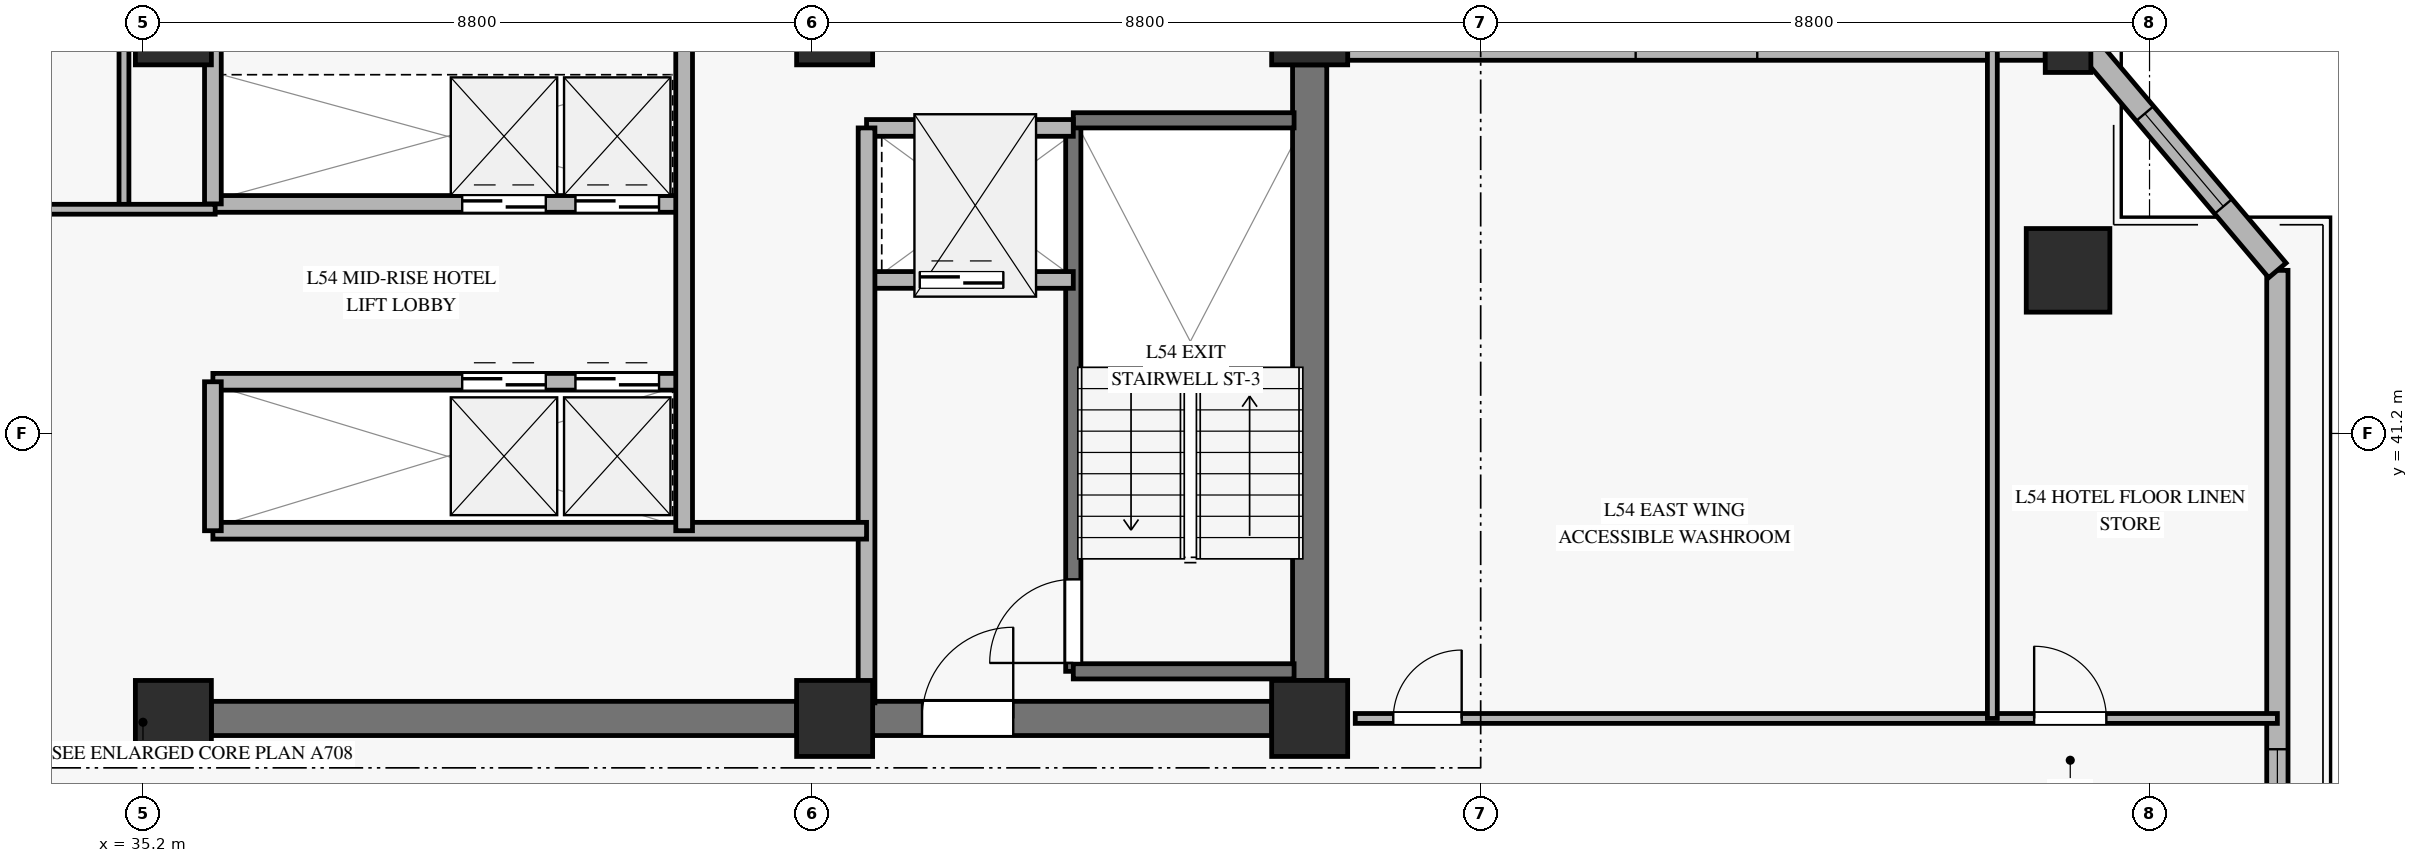
"""IFC4 building model, lengths in metres.
Left out: names, types, materials, properties, quantities, classifications, styles, units other than length and angle.
Written with IfcOpenShell. Run it as: python <this file> out.ifc"""

import sys

from ifc_helpers import new_model, si_unit, direction, frame, frame_2d, origin, origin_2d, place, context, subcontext, project, spatial, rectangle, hollow_rectangle, extrude, source, transform, mapped, element, fill, save


model = new_model("IFC4")
c1 = context("Model", 3, precision=1e-05, world=origin(), true_north=direction((0.0, 1.0)))
c2 = subcontext(c1, "Body", "Model", "MODEL_VIEW")
j1 = project(units=[si_unit("LENGTHUNIT", "METRE"), si_unit("PLANEANGLEUNIT", "RADIAN")], contexts=[c1])
p1 = place(None, origin())
s1 = spatial("IfcSite", under=j1, at=p1, CompositionType="ELEMENT")
p2 = place(p1, origin())
s2 = spatial("IfcBuilding", under=s1, at=p2, CompositionType="ELEMENT")
p3 = place(p2, frame((0.0, 0.0, 213.2)))
s3 = spatial("IfcBuildingStorey", under=s2, at=p3, CompositionType="ELEMENT", Elevation=213.2)
m1 = source(origin(), c2, "Body", "SweptSolid", [
    extrude(rectangle(XDim=1.0, YDim=1.0, at=origin_2d()), origin(), (0.0, 0.0, 1.0), 3.27),
])
for number, where, z_axis, x_axis in (
    (1, (35.6, 37.45, 0.0), (0.0, 0.0, 1.0), (1.0, 0.0, 0.0)),
    (2, (35.6, 46.55, 0.0), (0.0, 0.0, 1.0), (1.0, 0.0, 0.0)),
    (3, (44.3, 37.45, 0.0), (0.0, 0.0, 1.0), (1.0, 0.0, 0.0)),
    (4, (44.3, 46.55, 0.0), (0.0, 0.0, 1.0), (1.0, 0.0, 0.0)),
    (5, (50.55, 37.45, 0.0), (0.0, 0.0, 1.0), (1.0, 0.0, 0.0)),
    (6, (50.55, 46.55, 0.0), (0.0, 0.0, 1.0), (1.0, 0.0, 0.0)),
):
    element("IfcColumn", number, at=place(p3, frame(where, z_axis=z_axis, x_axis=x_axis)), inside=s3, PredefinedType="PILASTER", context=c2, shape_type="MappedRepresentation", body=[
        mapped(m1, transform((0.0, 0.0, 0.0), x_axis=(1.0, 0.0, 0.0), y_axis=(0.0, 1.0, 0.0), z_axis=(0.0, 0.0, 1.0), scale=1.0)),
    ])
p4 = place(p3, frame((36.1, 37.45, 0.0), z_axis=(0.0, 0.0, 1.0), x_axis=(1.0, 0.0, 0.0)))
e7 = element("IfcWall", 7, at=p4, inside=s3, PredefinedType="SHEAR", context=c2, shape_type="SweptSolid", body=[
    extrude(rectangle(XDim=7.7, YDim=0.45, at=frame_2d((3.85, 0.0))), origin(), (0.0, 0.0, 1.0), 3.27),
])
p5 = place(p3, frame((44.8, 37.45, 0.0), z_axis=(0.0, 0.0, 1.0), x_axis=(1.0, 0.0, 0.0)))
e8 = element("IfcWall", 8, at=p5, inside=s3, PredefinedType="SHEAR", context=c2, shape_type="SweptSolid", body=[
    extrude(rectangle(XDim=5.25, YDim=0.45, at=frame_2d((2.625, 0.0))), origin(), (0.0, 0.0, 1.0), 3.27),
])
p6 = place(p5, frame((0.65, 0.0, 0.0)))
e9 = element("IfcOpeningElement", 9, at=p6, cuts=e8, PredefinedType="OPENING", context=c2, shape_type="SweptSolid", body=[
    extrude(rectangle(XDim=1.2, YDim=2.15, at=frame_2d((0.6, 1.075))), frame((0.0, 0.235, 0.0), z_axis=(0.0, -1.0, 0.0), x_axis=(1.0, 0.0, 0.0)), (0.0, 0.0, 1.0), 0.47),
])
p7 = place(p3, frame((50.55, 37.95, 0.0), z_axis=(0.0, 0.0, 1.0), x_axis=(0.0, 1.0, 0.0)))
e10 = element("IfcWall", 10, at=p7, inside=s3, PredefinedType="SHEAR", context=c2, shape_type="SweptSolid", body=[
    extrude(rectangle(XDim=8.1, YDim=0.45, at=frame_2d((4.05, 0.0))), origin(), (0.0, 0.0, 1.0), 3.27),
])
m2 = source(origin(), c2, "Body", "SweptSolid", [
    extrude(hollow_rectangle(XDim=1.1, YDim=1.1, WallThickness=0.05, at=origin_2d()), origin(), (0.0, 0.0, 1.0), 3.27),
])
p8 = place(p3, frame((60.528, 43.346, 0.0), z_axis=(0.0, 0.0, 1.0), x_axis=(1.0, 0.0, 0.0)))
e11 = element("IfcColumn", 11, at=p8, inside=s3, PredefinedType="COLUMN", context=c2, shape_type="MappedRepresentation", body=[
    mapped(m2, transform((0.0, 0.0, 0.0), x_axis=(1.0, 0.0, 0.0), y_axis=(0.0, 1.0, 0.0), z_axis=(0.0, 0.0, 1.0), scale=1.0)),
])
m3 = source(origin(), c2, "Body", "SweptSolid", [
    extrude(hollow_rectangle(XDim=0.6, YDim=0.6, WallThickness=0.028, at=origin_2d()), origin(), (0.0, 0.0, 1.0), 3.27),
])
p9 = place(p3, frame((60.528, 46.25, 0.0), z_axis=(0.0, 0.0, 1.0), x_axis=(1.0, 0.0, 0.0)))
e12 = element("IfcColumn", 12, at=p9, inside=s3, PredefinedType="COLUMN", context=c2, shape_type="MappedRepresentation", body=[
    mapped(m3, transform((0.0, 0.0, 0.0), x_axis=(1.0, 0.0, 0.0), y_axis=(0.0, 1.0, 0.0), z_axis=(0.0, 0.0, 1.0), scale=1.0)),
])
p10 = place(p3, frame((63.282, 29.509, 0.0), z_axis=(0.0, 0.0, 1.0), x_axis=(0.0, 1.0, 0.0)))
e13 = element("IfcWall", 13, at=p10, inside=s3, PredefinedType="SOLIDWALL", context=c2, shape_type="SweptSolid", body=[
    extrude(rectangle(XDim=13.837, YDim=0.28, at=frame_2d((6.918, 0.0))), origin(), (0.0, 0.0, 1.0), 2.75),
])
p11 = place(p10, frame((5.536, 0.0, 0.45)))
e14 = element("IfcOpeningElement", 14, at=p11, cuts=e13, PredefinedType="OPENING", context=c2, shape_type="SweptSolid", body=[
    extrude(rectangle(XDim=2.0, YDim=2.0, at=frame_2d((1.0, 1.0))), frame((0.0, 0.15, 0.0), z_axis=(0.0, -1.0, 0.0), x_axis=(1.0, 0.0, 0.0)), (0.0, 0.0, 1.0), 0.3),
])
p12 = place(p3, frame((51.05, 46.25, 0.0), z_axis=(0.0, 0.0, 1.0), x_axis=(1.0, 0.0, 0.0)))
e15 = element("IfcWall", 15, at=p12, inside=s3, PredefinedType="SOLIDWALL", context=c2, shape_type="SweptSolid", body=[
    extrude(rectangle(XDim=9.178, YDim=0.28, at=frame_2d((4.589, 0.0))), origin(), (0.0, 0.0, 1.0), 2.75),
])
p13 = place(p12, frame((3.789, 0.0, 0.45)))
e16 = element("IfcOpeningElement", 16, at=p13, cuts=e15, PredefinedType="OPENING", context=c2, shape_type="SweptSolid", body=[
    extrude(rectangle(XDim=1.6, YDim=2.0, at=frame_2d((0.8, 1.0))), frame((0.0, 0.15, 0.0), z_axis=(0.0, -1.0, 0.0), x_axis=(1.0, 0.0, 0.0)), (0.0, 0.0, 1.0), 0.3),
])
p14 = place(p3, frame((63.282, 43.346, 0.0), z_axis=(0.0, 0.0, 1.0), x_axis=(-0.645455651603, 0.763797749286, 0.0)))
e17 = element("IfcWall", 17, at=p14, inside=s3, PredefinedType="SOLIDWALL", context=c2, shape_type="SweptSolid", body=[
    extrude(rectangle(XDim=3.802, YDim=0.3, at=frame_2d((1.901, 0.0))), origin(), (0.0, 0.0, 1.0), 2.75),
])
p15 = place(p14, frame((1.101, 0.0, 0.45)))
e18 = element("IfcOpeningElement", 18, at=p15, cuts=e17, PredefinedType="OPENING", context=c2, shape_type="SweptSolid", body=[
    extrude(rectangle(XDim=1.6, YDim=2.0, at=frame_2d((0.8, 1.0))), frame((0.0, 0.16, 0.0), z_axis=(0.0, -1.0, 0.0), x_axis=(1.0, 0.0, 0.0)), (0.0, 0.0, 1.0), 0.32),
])
p16 = place(p3, frame((47.44, 38.07, 0.0), z_axis=(0.0, 0.0, 1.0), x_axis=(0.0, 1.0, 0.0)))
e19 = element("IfcWall", 19, at=p16, inside=s3, PredefinedType="SOLIDWALL", context=c2, shape_type="SweptSolid", body=[
    extrude(rectangle(XDim=7.25, YDim=0.2, at=frame_2d((3.625, 0.0))), origin(), (0.0, 0.0, 1.0), 3.5),
])
p17 = place(p16, frame((0.11, 0.0, 0.0)))
e20 = element("IfcOpeningElement", 20, at=p17, cuts=e19, PredefinedType="OPENING", context=c2, shape_type="SweptSolid", body=[
    extrude(rectangle(XDim=1.1, YDim=2.15, at=frame_2d((0.55, 1.075))), frame((0.0, 0.11, 0.0), z_axis=(0.0, -1.0, 0.0), x_axis=(1.0, 0.0, 0.0)), (0.0, 0.0, 1.0), 0.22),
])
for number, where, z_axis, x_axis in (
    (21, (47.44, 45.32, 0.0), (0.0, 0.0, 1.0), (1.0, 0.0, 0.0)),
    (22, (47.44, 38.07, 0.0), (0.0, 0.0, 1.0), (1.0, 0.0, 0.0)),
):
    element("IfcWall", number, at=place(p3, frame(where, z_axis=z_axis, x_axis=x_axis)), inside=s3, PredefinedType="SOLIDWALL", context=c2, shape_type="SweptSolid", body=[
        extrude(rectangle(XDim=2.905, YDim=0.2, at=frame_2d((1.453, 0.0))), origin(), (0.0, 0.0, 1.0), 3.5),
    ])
p18 = place(p3, frame((44.72, 43.22, 0.0), z_axis=(0.0, 0.0, 1.0), x_axis=(1.0, 0.0, 0.0)))
e23 = element("IfcWall", 23, at=p18, inside=s3, PredefinedType="SOLIDWALL", context=c2, shape_type="SweptSolid", body=[
    extrude(rectangle(XDim=2.72, YDim=0.22, at=frame_2d((1.36, 0.0))), origin(), (0.0, 0.0, 1.0), 3.27),
])
p19 = place(p18, frame((0.7, 0.0, 0.0)))
e24 = element("IfcOpeningElement", 24, at=p19, cuts=e23, PredefinedType="OPENING", context=c2, shape_type="SweptSolid", body=[
    extrude(rectangle(XDim=1.1, YDim=2.2, at=frame_2d((0.55, 1.1))), frame((0.0, 0.12, 0.0), z_axis=(0.0, -1.0, 0.0), x_axis=(1.0, 0.0, 0.0)), (0.0, 0.0, 1.0), 0.24),
])
p20 = place(p3, frame((44.72, 45.22, 0.0), z_axis=(0.0, 0.0, 1.0), x_axis=(1.0, 0.0, 0.0)))
e25 = element("IfcWall", 25, at=p20, inside=s3, PredefinedType="SOLIDWALL", context=c2, shape_type="SweptSolid", body=[
    extrude(rectangle(XDim=2.72, YDim=0.22, at=frame_2d((1.36, 0.0))), origin(), (0.0, 0.0, 1.0), 3.27),
])
p21 = place(p3, frame((44.72, 37.655, 0.0), z_axis=(0.0, 0.0, 1.0), x_axis=(0.0, 1.0, 0.0)))
e26 = element("IfcWall", 26, at=p21, inside=s3, PredefinedType="SOLIDWALL", context=c2, shape_type="SweptSolid", body=[
    extrude(rectangle(XDim=7.565, YDim=0.22, at=frame_2d((3.782, 0.0))), origin(), (0.0, 0.0, 1.0), 3.27),
])
p22 = place(p3, frame((36.12, 44.22, 0.0), z_axis=(0.0, 0.0, 1.0), x_axis=(1.0, 0.0, 0.0)))
e27 = element("IfcWall", 27, at=p22, inside=s3, PredefinedType="SOLIDWALL", context=c2, shape_type="SweptSolid", body=[
    extrude(rectangle(XDim=6.2, YDim=0.22, at=frame_2d((3.1, 0.0))), origin(), (0.0, 0.0, 1.0), 3.27),
])
p23 = place(p22, frame((3.28, 0.0, 0.0)))
e28 = element("IfcOpeningElement", 28, at=p23, cuts=e27, PredefinedType="OPENING", context=c2, shape_type="SweptSolid", body=[
    extrude(rectangle(XDim=1.1, YDim=2.2, at=frame_2d((0.55, 1.1))), frame((0.0, 0.12, 0.0), z_axis=(0.0, -1.0, 0.0), x_axis=(1.0, 0.0, 0.0)), (0.0, 0.0, 1.0), 0.24),
])
p24 = place(p22, frame((4.77, 0.0, 0.0)))
e29 = element("IfcOpeningElement", 29, at=p24, cuts=e27, PredefinedType="OPENING", context=c2, shape_type="SweptSolid", body=[
    extrude(rectangle(XDim=1.1, YDim=2.2, at=frame_2d((0.55, 1.1))), frame((0.0, 0.12, 0.0), z_axis=(0.0, -1.0, 0.0), x_axis=(1.0, 0.0, 0.0)), (0.0, 0.0, 1.0), 0.24),
])
p25 = place(p3, frame((36.12, 41.88, 0.0), z_axis=(0.0, 0.0, 1.0), x_axis=(1.0, 0.0, 0.0)))
e30 = element("IfcWall", 30, at=p25, inside=s3, PredefinedType="SOLIDWALL", context=c2, shape_type="SweptSolid", body=[
    extrude(rectangle(XDim=6.2, YDim=0.22, at=frame_2d((3.1, 0.0))), origin(), (0.0, 0.0, 1.0), 3.27),
])
p26 = place(p25, frame((3.28, 0.0, 0.0)))
e31 = element("IfcOpeningElement", 31, at=p26, cuts=e30, PredefinedType="OPENING", context=c2, shape_type="SweptSolid", body=[
    extrude(rectangle(XDim=1.1, YDim=2.2, at=frame_2d((0.55, 1.1))), frame((0.0, 0.12, 0.0), z_axis=(0.0, -1.0, 0.0), x_axis=(1.0, 0.0, 0.0)), (0.0, 0.0, 1.0), 0.24),
])
p27 = place(p25, frame((4.77, 0.0, 0.0)))
e32 = element("IfcOpeningElement", 32, at=p27, cuts=e30, PredefinedType="OPENING", context=c2, shape_type="SweptSolid", body=[
    extrude(rectangle(XDim=1.1, YDim=2.2, at=frame_2d((0.55, 1.1))), frame((0.0, 0.12, 0.0), z_axis=(0.0, -1.0, 0.0), x_axis=(1.0, 0.0, 0.0)), (0.0, 0.0, 1.0), 0.24),
])
p28 = place(p3, frame((36.12, 39.92, 0.0), z_axis=(0.0, 0.0, 1.0), x_axis=(1.0, 0.0, 0.0)))
e33 = element("IfcWall", 33, at=p28, inside=s3, PredefinedType="SOLIDWALL", context=c2, shape_type="SweptSolid", body=[
    extrude(rectangle(XDim=8.6, YDim=0.22, at=frame_2d((4.3, 0.0))), origin(), (0.0, 0.0, 1.0), 2.555),
])
p29 = place(p3, frame((42.32, 39.92, 0.0), z_axis=(0.0, 0.0, 1.0), x_axis=(0.0, 1.0, 0.0)))
e34 = element("IfcWall", 34, at=p29, inside=s3, PredefinedType="SOLIDWALL", context=c2, shape_type="SweptSolid", body=[
    extrude(rectangle(XDim=6.425, YDim=0.22, at=frame_2d((3.212, 0.0))), origin(), (0.0, 0.0, 1.0), 3.27),
])
p30 = place(p3, frame((36.12, 39.92, 0.0), z_axis=(0.0, 0.0, 1.0), x_axis=(0.0, 1.0, 0.0)))
e35 = element("IfcWall", 35, at=p30, inside=s3, PredefinedType="SOLIDWALL", context=c2, shape_type="SweptSolid", body=[
    extrude(rectangle(XDim=1.96, YDim=0.22, at=frame_2d((0.98, 0.0))), origin(), (0.0, 0.0, 1.0), 3.27),
])
p31 = place(p3, frame((36.12, 44.22, 0.0), z_axis=(0.0, 0.0, 1.0), x_axis=(0.0, 1.0, 0.0)))
e36 = element("IfcWall", 36, at=p31, inside=s3, PredefinedType="SOLIDWALL", context=c2, shape_type="SweptSolid", body=[
    extrude(rectangle(XDim=2.125, YDim=0.22, at=frame_2d((1.062, 0.0))), origin(), (0.0, 0.0, 1.0), 3.27),
])
p32 = place(p3, frame((34.95, 44.15, 0.0), z_axis=(0.0, 0.0, 1.0), x_axis=(0.0, 1.0, 0.0)))
e37 = element("IfcWall", 37, at=p32, inside=s3, PredefinedType="PARTITIONING", context=c2, shape_type="SweptSolid", body=[
    extrude(rectangle(XDim=2.195, YDim=0.13, at=frame_2d((1.098, 0.0))), origin(), (0.0, 0.0, 1.0), 3.27),
])
p33 = place(p3, frame((33.18, 44.15, 0.0), z_axis=(0.0, 0.0, 1.0), x_axis=(1.0, 0.0, 0.0)))
e38 = element("IfcWall", 38, at=p33, inside=s3, PredefinedType="PARTITIONING", context=c2, shape_type="SweptSolid", body=[
    extrude(rectangle(XDim=2.97, YDim=0.13, at=frame_2d((1.485, 0.0))), origin(), (0.0, 0.0, 1.0), 2.555),
])
p34 = place(p3, frame((51.15, 37.45, 0.0), z_axis=(0.0, 0.0, 1.0), x_axis=(1.0, 0.0, 0.0)))
e39 = element("IfcWall", 39, at=p34, inside=s3, PredefinedType="PARTITIONING", context=c2, shape_type="SweptSolid", body=[
    extrude(rectangle(XDim=12.132, YDim=0.13, at=frame_2d((6.066, 0.0))), origin(), (0.0, 0.0, 1.0), 2.755),
])
p35 = place(p34, frame((0.5, 0.0, 0.0)))
e40 = element("IfcOpeningElement", 40, at=p35, cuts=e39, PredefinedType="OPENING", context=c2, shape_type="SweptSolid", body=[
    extrude(rectangle(XDim=0.9, YDim=2.1, at=frame_2d((0.45, 1.05))), frame((0.0, 0.075, 0.0), z_axis=(0.0, -1.0, 0.0), x_axis=(1.0, 0.0, 0.0)), (0.0, 0.0, 1.0), 0.15),
])
p36 = place(p34, frame((8.932, 0.0, 0.0)))
e41 = element("IfcOpeningElement", 41, at=p36, cuts=e39, PredefinedType="OPENING", context=c2, shape_type="SweptSolid", body=[
    extrude(rectangle(XDim=0.95, YDim=2.1, at=frame_2d((0.475, 1.05))), frame((0.0, 0.075, 0.0), z_axis=(0.0, -1.0, 0.0), x_axis=(1.0, 0.0, 0.0)), (0.0, 0.0, 1.0), 0.15),
])
p37 = place(p3, frame((59.532, 37.45, 0.0), z_axis=(0.0, 0.0, 1.0), x_axis=(0.0, 1.0, 0.0)))
e42 = element("IfcWall", 42, at=p37, inside=s3, PredefinedType="PARTITIONING", context=c2, shape_type="SweptSolid", body=[
    extrude(rectangle(XDim=8.8, YDim=0.13, at=frame_2d((4.4, 0.0))), origin(), (0.0, 0.0, 1.0), 2.755),
])
m4 = source(origin(), c2, "Body", "SweptSolid", [
    extrude(rectangle(XDim=2.0, YDim=2.0, at=frame_2d((1.0, 1.0))), frame((0.0, 0.03, 0.0), z_axis=(0.0, -1.0, 0.0), x_axis=(1.0, 0.0, 0.0)), (0.0, 0.0, 1.0), 0.06),
])
p38 = place(p11, origin())
e43 = element("IfcWindow", 43, at=p38, inside=s3, PartitioningType="SINGLE_PANEL", PredefinedType="WINDOW", context=c2, shape_type="MappedRepresentation", body=[
    mapped(m4, transform((0.0, 0.0, 0.0), x_axis=(1.0, 0.0, 0.0), y_axis=(0.0, 1.0, 0.0), z_axis=(0.0, 0.0, 1.0), scale=1.0)),
])
fill(e14, e43)
m5 = source(origin(), c2, "Body", "SweptSolid", [
    extrude(rectangle(XDim=1.6, YDim=2.0, at=frame_2d((0.8, 1.0))), frame((0.0, 0.03, 0.0), z_axis=(0.0, -1.0, 0.0), x_axis=(1.0, 0.0, 0.0)), (0.0, 0.0, 1.0), 0.06),
])
p39 = place(p15, origin())
e44 = element("IfcWindow", 44, at=p39, inside=s3, PartitioningType="SINGLE_PANEL", PredefinedType="WINDOW", context=c2, shape_type="MappedRepresentation", body=[
    mapped(m5, transform((0.0, 0.0, 0.0), x_axis=(1.0, 0.0, 0.0), y_axis=(0.0, 1.0, 0.0), z_axis=(0.0, 0.0, 1.0), scale=1.0)),
])
fill(e18, e44)
m6 = source(origin(), c2, "Body", "SweptSolid", [
    extrude(rectangle(XDim=1.1, YDim=2.15, at=frame_2d((0.55, 1.075))), frame((0.0, 0.025, 0.0), z_axis=(0.0, -1.0, 0.0), x_axis=(1.0, 0.0, 0.0)), (0.0, 0.0, 1.0), 0.05),
])
p40 = place(p17, origin())
e45 = element("IfcDoor", 45, at=p40, inside=s3, OperationType="SINGLE_SWING_LEFT", PredefinedType="DOOR", context=c2, shape_type="MappedRepresentation", body=[
    mapped(m6, transform((0.0, 0.0, 0.0), x_axis=(1.0, 0.0, 0.0), y_axis=(0.0, 1.0, 0.0), z_axis=(0.0, 0.0, 1.0), scale=1.0)),
])
fill(e20, e45)
m7 = source(origin(), c2, "Body", "SweptSolid", [
    extrude(rectangle(XDim=1.1, YDim=2.2, at=frame_2d((0.55, 1.1))), frame((0.0, 0.025, 0.0), z_axis=(0.0, -1.0, 0.0), x_axis=(1.0, 0.0, 0.0)), (0.0, 0.0, 1.0), 0.05),
])
p41 = place(p19, origin())
e46 = element("IfcDoor", 46, at=p41, inside=s3, OperationType="SLIDING_TO_LEFT", PredefinedType="DOOR", context=c2, shape_type="MappedRepresentation", body=[
    mapped(m7, transform((0.0, 0.0, 0.0), x_axis=(1.0, 0.0, 0.0), y_axis=(0.0, 1.0, 0.0), z_axis=(0.0, 0.0, 1.0), scale=1.0)),
])
fill(e24, e46)
m8 = source(origin(), c2, "Body", "SweptSolid", [
    extrude(rectangle(XDim=1.2, YDim=2.15, at=frame_2d((0.6, 1.075))), frame((0.0, 0.025, 0.0), z_axis=(0.0, -1.0, 0.0), x_axis=(1.0, 0.0, 0.0)), (0.0, 0.0, 1.0), 0.05),
])
p42 = place(p6, origin())
e47 = element("IfcDoor", 47, at=p42, inside=s3, OperationType="SINGLE_SWING_RIGHT", PredefinedType="DOOR", context=c2, shape_type="MappedRepresentation", body=[
    mapped(m8, transform((0.0, 0.0, 0.0), x_axis=(1.0, 0.0, 0.0), y_axis=(0.0, 1.0, 0.0), z_axis=(0.0, 0.0, 1.0), scale=1.0)),
])
fill(e9, e47)
p43 = place(p23, origin())
e48 = element("IfcDoor", 48, at=p43, inside=s3, OperationType="SLIDING_TO_LEFT", PredefinedType="DOOR", context=c2, shape_type="MappedRepresentation", body=[
    mapped(m7, transform((0.0, 0.0, 0.0), x_axis=(1.0, 0.0, 0.0), y_axis=(0.0, 1.0, 0.0), z_axis=(0.0, 0.0, 1.0), scale=1.0)),
])
fill(e28, e48)
p44 = place(p24, origin())
e49 = element("IfcDoor", 49, at=p44, inside=s3, OperationType="SLIDING_TO_LEFT", PredefinedType="DOOR", context=c2, shape_type="MappedRepresentation", body=[
    mapped(m7, transform((0.0, 0.0, 0.0), x_axis=(1.0, 0.0, 0.0), y_axis=(0.0, 1.0, 0.0), z_axis=(0.0, 0.0, 1.0), scale=1.0)),
])
fill(e29, e49)
p45 = place(p26, origin())
e50 = element("IfcDoor", 50, at=p45, inside=s3, OperationType="SLIDING_TO_LEFT", PredefinedType="DOOR", context=c2, shape_type="MappedRepresentation", body=[
    mapped(m7, transform((0.0, 0.0, 0.0), x_axis=(1.0, 0.0, 0.0), y_axis=(0.0, 1.0, 0.0), z_axis=(0.0, 0.0, 1.0), scale=1.0)),
])
fill(e31, e50)
p46 = place(p27, origin())
e51 = element("IfcDoor", 51, at=p46, inside=s3, OperationType="SLIDING_TO_LEFT", PredefinedType="DOOR", context=c2, shape_type="MappedRepresentation", body=[
    mapped(m7, transform((0.0, 0.0, 0.0), x_axis=(1.0, 0.0, 0.0), y_axis=(0.0, 1.0, 0.0), z_axis=(0.0, 0.0, 1.0), scale=1.0)),
])
fill(e32, e51)
m9 = source(origin(), c2, "Body", "SweptSolid", [
    extrude(rectangle(XDim=0.9, YDim=2.1, at=frame_2d((0.45, 1.05))), frame((0.0, 0.025, 0.0), z_axis=(0.0, -1.0, 0.0), x_axis=(1.0, 0.0, 0.0)), (0.0, 0.0, 1.0), 0.05),
])
p47 = place(p35, origin())
e52 = element("IfcDoor", 52, at=p47, inside=s3, OperationType="SINGLE_SWING_RIGHT", PredefinedType="DOOR", context=c2, shape_type="MappedRepresentation", body=[
    mapped(m9, transform((0.0, 0.0, 0.0), x_axis=(1.0, 0.0, 0.0), y_axis=(0.0, 1.0, 0.0), z_axis=(0.0, 0.0, 1.0), scale=1.0)),
])
fill(e40, e52)
m10 = source(origin(), c2, "Body", "SweptSolid", [
    extrude(rectangle(XDim=0.95, YDim=2.1, at=frame_2d((0.475, 1.05))), frame((0.0, 0.025, 0.0), z_axis=(0.0, -1.0, 0.0), x_axis=(1.0, 0.0, 0.0)), (0.0, 0.0, 1.0), 0.05),
])
p48 = place(p36, origin())
e53 = element("IfcDoor", 53, at=p48, inside=s3, OperationType="SINGLE_SWING_LEFT", PredefinedType="DOOR", context=c2, shape_type="MappedRepresentation", body=[
    mapped(m10, transform((0.0, 0.0, 0.0), x_axis=(1.0, 0.0, 0.0), y_axis=(0.0, 1.0, 0.0), z_axis=(0.0, 0.0, 1.0), scale=1.0)),
])
fill(e41, e53)
save(model, sys.argv[1])
